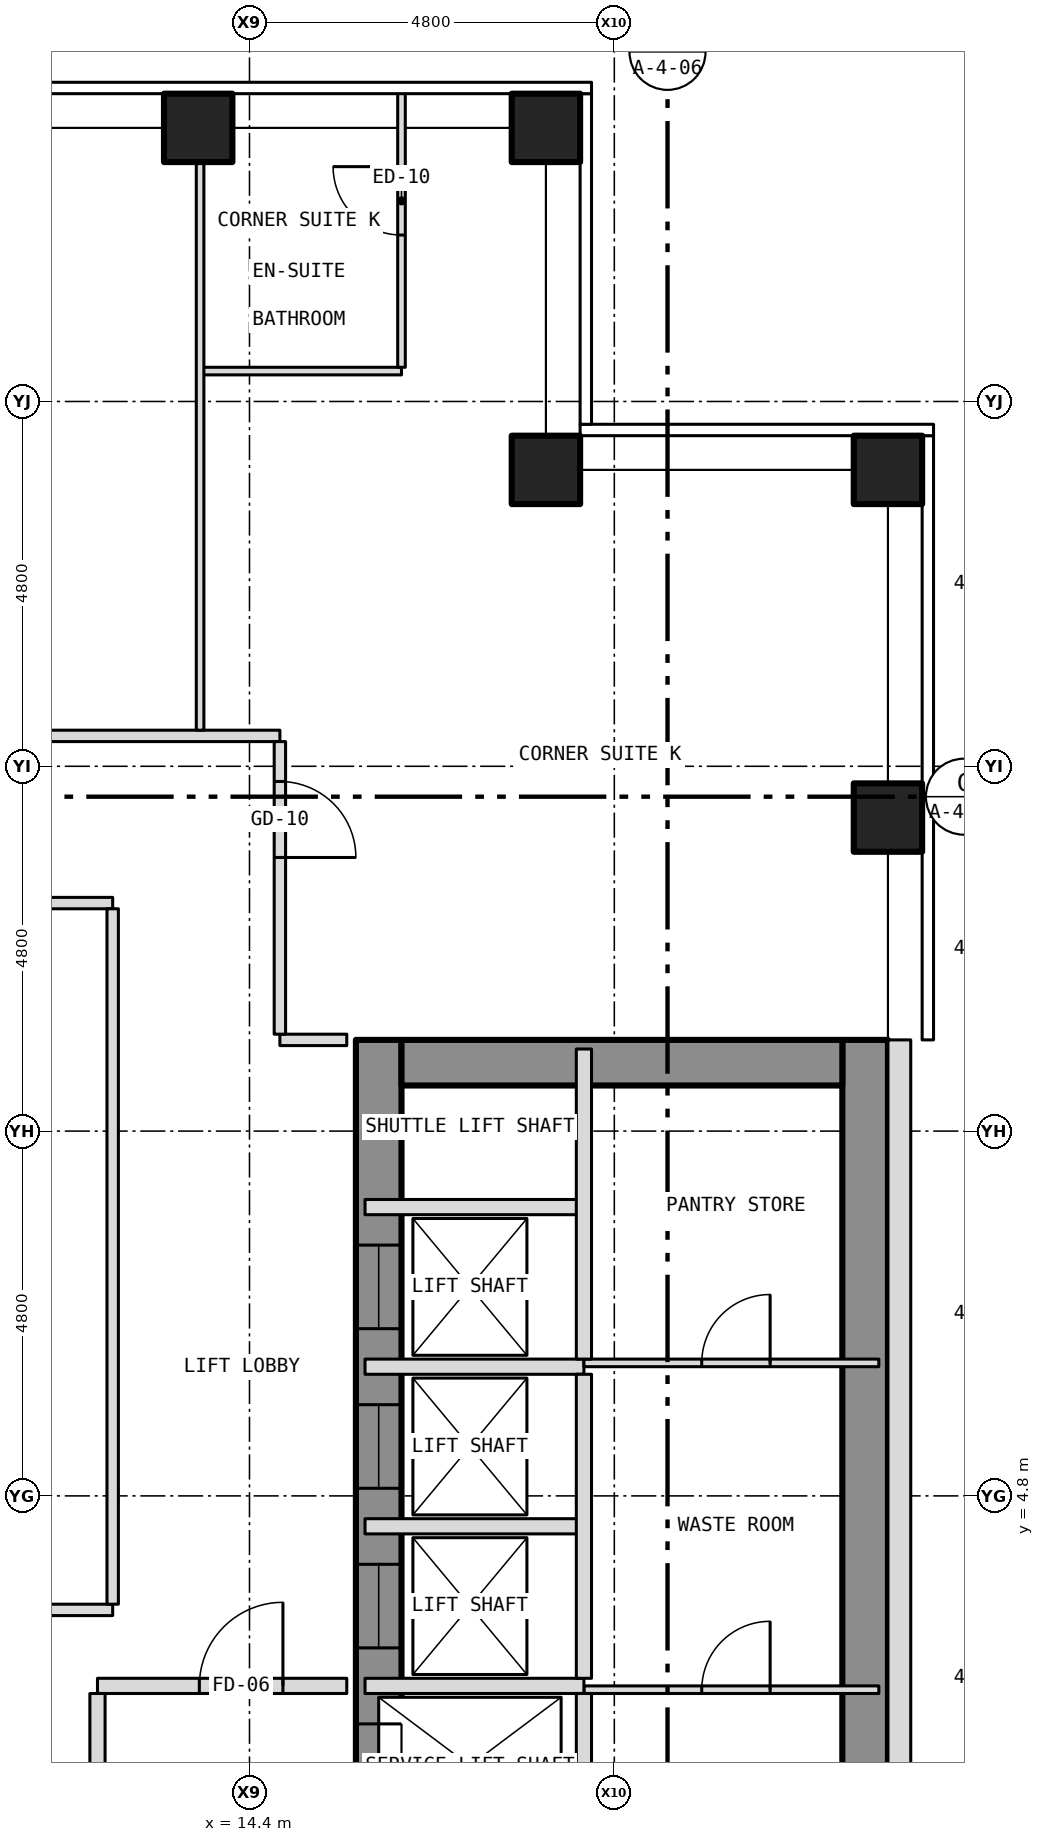
"""IFC4 building model, lengths in metres.
Left out: names, types, materials, properties, quantities, classifications, styles, units other than length and angle.
Written with IfcOpenShell. Run it as: python <this file> out.ifc"""

import sys

from ifc_helpers import new_model, si_unit, direction, frame, frame_2d, origin, origin_2d, place, context, subcontext, project, spatial, rectangle, hollow_rectangle, extrude, element, fill, save


model = new_model("IFC4")
c1 = context("Model", 3, precision=1e-05, world=origin(), true_north=direction((0.0, 1.0)))
c2 = subcontext(c1, "Body", "Model", "MODEL_VIEW")
j1 = project(units=[si_unit("LENGTHUNIT", "METRE"), si_unit("PLANEANGLEUNIT", "RADIAN")], contexts=[c1])
p1 = place(None, origin())
s1 = spatial("IfcSite", under=j1, at=p1, CompositionType="ELEMENT")
p2 = place(p1, origin())
s2 = spatial("IfcBuilding", under=s1, at=p2, CompositionType="ELEMENT")
p3 = place(p2, frame((0.0, 0.0, 103.0)))
s3 = spatial("IfcBuildingStorey", under=s2, at=p3, CompositionType="ELEMENT", Elevation=103.0)
for number, where, z_axis, x_axis in (
    (1, (13.725, 22.8, -0.15), (0.0, 0.0, 1.0), (1.0, 0.0, 0.0)),
    (2, (18.3, 22.8, -0.15), (0.0, 0.0, 1.0), (1.0, 0.0, 0.0)),
    (3, (22.8, 13.725, -0.15), (0.0, 0.0, 1.0), (1.0, 0.0, 0.0)),
    (4, (22.8, 18.3, -0.15), (0.0, 0.0, 1.0), (1.0, 0.0, 0.0)),
    (5, (18.3, 18.3, -0.15), (0.0, 0.0, 1.0), (1.0, 0.0, 0.0)),
):
    element("IfcColumn", number, at=place(p3, frame(where, z_axis=z_axis, x_axis=x_axis)), inside=s3, PredefinedType="COLUMN", context=c2, shape_type="SweptSolid", body=[
        extrude(hollow_rectangle(XDim=0.9, YDim=0.9, WallThickness=0.05, at=origin_2d()), origin(), (0.0, 0.0, 1.0), 3.5),
    ])
p4 = place(p3, frame((16.1, -10.8, 0.0), z_axis=(0.0, 0.0, 1.0), x_axis=(0.0, 1.0, 0.0)))
e6 = element("IfcWall", 6, at=p4, inside=s3, PredefinedType="SHEAR", context=c2, shape_type="SweptSolid", body=[
    extrude(rectangle(XDim=21.6, YDim=0.6, at=frame_2d((10.8, 0.0))), origin(), (0.0, 0.0, 1.0), 3.25),
])
p5 = place(p4, frame((9.4, 0.0, 0.0)))
e7 = element("IfcOpeningElement", 7, at=p5, cuts=e6, PredefinedType="OPENING", context=c2, shape_type="SweptSolid", body=[
    extrude(rectangle(XDim=1.1, YDim=2.1, at=frame_2d((0.55, 1.05))), frame((0.0, 0.312, 0.0), z_axis=(0.0, -1.0, 0.0), x_axis=(1.0, 0.0, 0.0)), (0.0, 0.0, 1.0), 0.624),
])
p6 = place(p4, frame((11.5, 0.0, 0.0)))
e8 = element("IfcOpeningElement", 8, at=p6, cuts=e6, PredefinedType="OPENING", context=c2, shape_type="SweptSolid", body=[
    extrude(rectangle(XDim=1.1, YDim=2.1, at=frame_2d((0.55, 1.05))), frame((0.0, 0.312, 0.0), z_axis=(0.0, -1.0, 0.0), x_axis=(1.0, 0.0, 0.0)), (0.0, 0.0, 1.0), 0.624),
])
p7 = place(p4, frame((13.6, 0.0, 0.0)))
e9 = element("IfcOpeningElement", 9, at=p7, cuts=e6, PredefinedType="OPENING", context=c2, shape_type="SweptSolid", body=[
    extrude(rectangle(XDim=1.1, YDim=2.1, at=frame_2d((0.55, 1.05))), frame((0.0, 0.312, 0.0), z_axis=(0.0, -1.0, 0.0), x_axis=(1.0, 0.0, 0.0)), (0.0, 0.0, 1.0), 0.624),
])
p8 = place(p4, frame((15.7, 0.0, 0.0)))
e10 = element("IfcOpeningElement", 10, at=p8, cuts=e6, PredefinedType="OPENING", context=c2, shape_type="SweptSolid", body=[
    extrude(rectangle(XDim=1.1, YDim=2.1, at=frame_2d((0.55, 1.05))), frame((0.0, 0.312, 0.0), z_axis=(0.0, -1.0, 0.0), x_axis=(1.0, 0.0, 0.0)), (0.0, 0.0, 1.0), 0.624),
])
p9 = place(p4, frame((17.8, 0.0, 0.0)))
e11 = element("IfcOpeningElement", 11, at=p9, cuts=e6, PredefinedType="OPENING", context=c2, shape_type="SweptSolid", body=[
    extrude(rectangle(XDim=1.1, YDim=2.1, at=frame_2d((0.55, 1.05))), frame((0.0, 0.312, 0.0), z_axis=(0.0, -1.0, 0.0), x_axis=(1.0, 0.0, 0.0)), (0.0, 0.0, 1.0), 0.624),
])
p10 = place(p4, frame((5.642, 0.0, 0.0)))
e12 = element("IfcOpeningElement", 12, at=p10, cuts=e6, PredefinedType="OPENING", context=c2, shape_type="SweptSolid", body=[
    extrude(rectangle(XDim=1.1, YDim=2.1, at=frame_2d((0.55, 1.05))), frame((0.0, 0.312, 0.0), z_axis=(0.0, -1.0, 0.0), x_axis=(1.0, 0.0, 0.0)), (0.0, 0.0, 1.0), 0.624),
])
p11 = place(p4, frame((7.5, 0.0, 0.0)))
e13 = element("IfcOpeningElement", 13, at=p11, cuts=e6, PredefinedType="OPENING", context=c2, shape_type="SweptSolid", body=[
    extrude(rectangle(XDim=1.1, YDim=2.1, at=frame_2d((0.55, 1.05))), frame((0.0, 0.312, 0.0), z_axis=(0.0, -1.0, 0.0), x_axis=(1.0, 0.0, 0.0)), (0.0, 0.0, 1.0), 0.624),
])
p12 = place(p3, frame((22.5, -10.8, 0.0), z_axis=(0.0, 0.0, 1.0), x_axis=(0.0, 1.0, 0.0)))
e14 = element("IfcWall", 14, at=p12, inside=s3, PredefinedType="SHEAR", context=c2, shape_type="SweptSolid", body=[
    extrude(rectangle(XDim=21.6, YDim=0.6, at=frame_2d((10.8, 0.0))), origin(), (0.0, 0.0, 1.0), 3.25),
])
p13 = place(p3, frame((16.4, 10.5, 0.0), z_axis=(0.0, 0.0, 1.0), x_axis=(1.0, 0.0, 0.0)))
e15 = element("IfcWall", 15, at=p13, inside=s3, PredefinedType="SHEAR", context=c2, shape_type="SweptSolid", body=[
    extrude(rectangle(XDim=5.8, YDim=0.6, at=frame_2d((2.9, 0.0))), origin(), (0.0, 0.0, 1.0), 3.25),
])
p14 = place(p3, frame((22.95, -10.8, 0.0), z_axis=(0.0, 0.0, 1.0), x_axis=(0.0, 1.0, 0.0)))
e16 = element("IfcWall", 16, at=p14, inside=s3, PredefinedType="SOLIDWALL", context=c2, shape_type="SweptSolid", body=[
    extrude(rectangle(XDim=21.6, YDim=0.3, at=frame_2d((10.8, 0.0))), origin(), (0.0, 0.0, 1.0), 3.5),
])
p15 = place(p14, frame((2.95, 0.0, 1.0)))
e17 = element("IfcOpeningElement", 17, at=p15, cuts=e16, PredefinedType="OPENING", context=c2, shape_type="SweptSolid", body=[
    extrude(rectangle(XDim=0.6, YDim=1.5, at=frame_2d((0.3, 0.75))), frame((0.0, 0.162, 0.0), z_axis=(0.0, -1.0, 0.0), x_axis=(1.0, 0.0, 0.0)), (0.0, 0.0, 1.0), 0.324),
])
p16 = place(p3, frame((18.8, 2.25, 0.0), z_axis=(0.0, 0.0, 1.0), x_axis=(1.0, 0.0, 0.0)))
e18 = element("IfcWall", 18, at=p16, inside=s3, PredefinedType="PARTITIONING", context=c2, shape_type="SweptSolid", body=[
    extrude(rectangle(XDim=3.88, YDim=0.1, at=frame_2d((1.94, 0.0))), origin(), (0.0, 0.0, 1.0), 3.25),
])
p17 = place(p16, frame((1.55, 0.0, 0.0)))
e19 = element("IfcOpeningElement", 19, at=p17, cuts=e18, PredefinedType="OPENING", context=c2, shape_type="SweptSolid", body=[
    extrude(rectangle(XDim=0.9, YDim=2.1, at=frame_2d((0.45, 1.05))), frame((0.0, 0.062, 0.0), z_axis=(0.0, -1.0, 0.0), x_axis=(1.0, 0.0, 0.0)), (0.0, 0.0, 1.0), 0.124),
])
p18 = place(p3, frame((12.4, 2.3, 0.0), z_axis=(0.0, 0.0, 1.0), x_axis=(1.0, 0.0, 0.0)))
e20 = element("IfcWall", 20, at=p18, inside=s3, PredefinedType="PARTITIONING", context=c2, shape_type="SweptSolid", body=[
    extrude(rectangle(XDim=3.28, YDim=0.2, at=frame_2d((1.64, 0.0))), origin(), (0.0, 0.0, 1.0), 3.35),
])
p19 = place(p18, frame((1.34, 0.0, 0.0)))
e21 = element("IfcOpeningElement", 21, at=p19, cuts=e20, PredefinedType="OPENING", context=c2, shape_type="SweptSolid", body=[
    extrude(rectangle(XDim=1.1, YDim=2.1, at=frame_2d((0.55, 1.05))), frame((0.0, 0.112, 0.0), z_axis=(0.0, -1.0, 0.0), x_axis=(1.0, 0.0, 0.0)), (0.0, 0.0, 1.0), 0.224),
])
p20 = place(p3, frame((15.92, 2.3, 0.0), z_axis=(0.0, 0.0, 1.0), x_axis=(1.0, 0.0, 0.0)))
e22 = element("IfcWall", 22, at=p20, inside=s3, PredefinedType="PARTITIONING", context=c2, shape_type="SweptSolid", body=[
    extrude(rectangle(XDim=2.88, YDim=0.2, at=frame_2d((1.44, 0.0))), origin(), (0.0, 0.0, 1.0), 3.25),
])
p21 = place(p3, frame((-12.6, 3.3, 0.0), z_axis=(0.0, 0.0, 1.0), x_axis=(1.0, 0.0, 0.0)))
e23 = element("IfcWall", 23, at=p21, inside=s3, PredefinedType="PARTITIONING", context=c2, shape_type="SweptSolid", body=[
    extrude(rectangle(XDim=25.2, YDim=0.15, at=frame_2d((12.6, 0.0))), origin(), (0.0, 0.0, 1.0), 3.35),
])
for number, where, z_axis, x_axis in (
    (24, (15.92, 4.4, 0.0), (0.0, 0.0, 1.0), (1.0, 0.0, 0.0)),
    (25, (15.92, 6.5, 0.0), (0.0, 0.0, 1.0), (1.0, 0.0, 0.0)),
):
    element("IfcWall", number, at=place(p3, frame(where, z_axis=z_axis, x_axis=x_axis)), inside=s3, PredefinedType="PARTITIONING", context=c2, shape_type="SweptSolid", body=[
        extrude(rectangle(XDim=2.88, YDim=0.2, at=frame_2d((1.44, 0.0))), origin(), (0.0, 0.0, 1.0), 3.25),
    ])
p22 = place(p3, frame((18.8, 6.55, 0.0), z_axis=(0.0, 0.0, 1.0), x_axis=(1.0, 0.0, 0.0)))
e26 = element("IfcWall", 26, at=p22, inside=s3, PredefinedType="PARTITIONING", context=c2, shape_type="SweptSolid", body=[
    extrude(rectangle(XDim=3.88, YDim=0.1, at=frame_2d((1.94, 0.0))), origin(), (0.0, 0.0, 1.0), 3.25),
])
p23 = place(p22, frame((1.55, 0.0, 0.0)))
e27 = element("IfcOpeningElement", 27, at=p23, cuts=e26, PredefinedType="OPENING", context=c2, shape_type="SweptSolid", body=[
    extrude(rectangle(XDim=0.9, YDim=2.1, at=frame_2d((0.45, 1.05))), frame((0.0, 0.062, 0.0), z_axis=(0.0, -1.0, 0.0), x_axis=(1.0, 0.0, 0.0)), (0.0, 0.0, 1.0), 0.124),
])
p24 = place(p3, frame((15.92, 8.6, 0.0), z_axis=(0.0, 0.0, 1.0), x_axis=(1.0, 0.0, 0.0)))
e28 = element("IfcWall", 28, at=p24, inside=s3, PredefinedType="PARTITIONING", context=c2, shape_type="SweptSolid", body=[
    extrude(rectangle(XDim=2.88, YDim=0.2, at=frame_2d((1.44, 0.0))), origin(), (0.0, 0.0, 1.0), 3.25),
])
p25 = place(p3, frame((14.8, 10.8, 0.0), z_axis=(0.0, 0.0, 1.0), x_axis=(1.0, 0.0, 0.0)))
e29 = element("IfcWall", 29, at=p25, inside=s3, PredefinedType="PARTITIONING", context=c2, shape_type="SweptSolid", body=[
    extrude(rectangle(XDim=0.88, YDim=0.15, at=frame_2d((0.44, 0.0))), origin(), (0.0, 0.0, 1.0), 3.35),
])
p26 = place(p3, frame((-12.6, 12.6, 0.0), z_axis=(0.0, 0.0, 1.0), x_axis=(1.0, 0.0, 0.0)))
e30 = element("IfcWall", 30, at=p26, inside=s3, PredefinedType="PARTITIONING", context=c2, shape_type="SweptSolid", body=[
    extrude(rectangle(XDim=25.2, YDim=0.15, at=frame_2d((12.6, 0.0))), origin(), (0.0, 0.0, 1.0), 3.35),
])
p27 = place(p26, frame((5.85, 0.0, 0.0)))
e31 = element("IfcOpeningElement", 31, at=p27, cuts=e30, PredefinedType="OPENING", context=c2, shape_type="SweptSolid", body=[
    extrude(rectangle(XDim=0.9, YDim=2.1, at=frame_2d((0.45, 1.05))), frame((0.0, 0.087, 0.0), z_axis=(0.0, -1.0, 0.0), x_axis=(1.0, 0.0, 0.0)), (0.0, 0.0, 1.0), 0.174),
])
p28 = place(p26, frame((18.45, 0.0, 0.0)))
e32 = element("IfcOpeningElement", 32, at=p28, cuts=e30, PredefinedType="OPENING", context=c2, shape_type="SweptSolid", body=[
    extrude(rectangle(XDim=0.9, YDim=2.1, at=frame_2d((0.45, 1.05))), frame((0.0, 0.087, 0.0), z_axis=(0.0, -1.0, 0.0), x_axis=(1.0, 0.0, 0.0)), (0.0, 0.0, 1.0), 0.174),
])
p29 = place(p3, frame((-14.8, 14.8, 0.0), z_axis=(0.0, 0.0, 1.0), x_axis=(1.0, 0.0, 0.0)))
e33 = element("IfcWall", 33, at=p29, inside=s3, PredefinedType="PARTITIONING", context=c2, shape_type="SweptSolid", body=[
    extrude(rectangle(XDim=29.6, YDim=0.15, at=frame_2d((14.8, 0.0))), origin(), (0.0, 0.0, 1.0), 3.35),
])
p30 = place(p29, frame((3.963, 0.0, 0.0)))
e34 = element("IfcOpeningElement", 34, at=p30, cuts=e33, PredefinedType="OPENING", context=c2, shape_type="SweptSolid", body=[
    extrude(rectangle(XDim=1.0, YDim=2.1, at=frame_2d((0.5, 1.05))), frame((0.0, 0.087, 0.0), z_axis=(0.0, -1.0, 0.0), x_axis=(1.0, 0.0, 0.0)), (0.0, 0.0, 1.0), 0.174),
])
p31 = place(p29, frame((12.241, 0.0, 0.0)))
e35 = element("IfcOpeningElement", 35, at=p31, cuts=e33, PredefinedType="OPENING", context=c2, shape_type="SweptSolid", body=[
    extrude(rectangle(XDim=1.0, YDim=2.1, at=frame_2d((0.5, 1.05))), frame((0.0, 0.087, 0.0), z_axis=(0.0, -1.0, 0.0), x_axis=(1.0, 0.0, 0.0)), (0.0, 0.0, 1.0), 0.174),
])
p32 = place(p29, frame((21.213, 0.0, 0.0)))
e36 = element("IfcOpeningElement", 36, at=p32, cuts=e33, PredefinedType="OPENING", context=c2, shape_type="SweptSolid", body=[
    extrude(rectangle(XDim=0.9, YDim=2.1, at=frame_2d((0.45, 1.05))), frame((0.0, 0.087, 0.0), z_axis=(0.0, -1.0, 0.0), x_axis=(1.0, 0.0, 0.0)), (0.0, 0.0, 1.0), 0.174),
])
p33 = place(p3, frame((13.75, 19.6, 0.0), z_axis=(0.0, 0.0, 1.0), x_axis=(1.0, 0.0, 0.0)))
e37 = element("IfcWall", 37, at=p33, inside=s3, PredefinedType="PARTITIONING", context=c2, shape_type="SweptSolid", body=[
    extrude(rectangle(XDim=2.65, YDim=0.1, at=frame_2d((1.325, 0.0))), origin(), (0.0, 0.0, 1.0), 3.35),
])
p34 = place(p3, frame((12.4, -1.8, 0.0), z_axis=(0.0, 0.0, 1.0), x_axis=(0.0, 1.0, 0.0)))
e38 = element("IfcWall", 38, at=p34, inside=s3, PredefinedType="PARTITIONING", context=c2, shape_type="SweptSolid", body=[
    extrude(rectangle(XDim=4.0, YDim=0.2, at=frame_2d((2.0, 0.0))), origin(), (0.0, 0.0, 1.0), 3.35),
])
p35 = place(p3, frame((12.6, 3.375, 0.0), z_axis=(0.0, 0.0, 1.0), x_axis=(0.0, 1.0, 0.0)))
e39 = element("IfcWall", 39, at=p35, inside=s3, PredefinedType="PARTITIONING", context=c2, shape_type="SweptSolid", body=[
    extrude(rectangle(XDim=9.15, YDim=0.15, at=frame_2d((4.575, 0.0))), origin(), (0.0, 0.0, 1.0), 3.35),
])
p36 = place(p3, frame((13.75, 14.875, 0.0), z_axis=(0.0, 0.0, 1.0), x_axis=(0.0, 1.0, 0.0)))
e40 = element("IfcWall", 40, at=p36, inside=s3, PredefinedType="PARTITIONING", context=c2, shape_type="SweptSolid", body=[
    extrude(rectangle(XDim=7.805, YDim=0.1, at=frame_2d((3.902, 0.0))), origin(), (0.0, 0.0, 1.0), 3.35),
])
p37 = place(p3, frame((14.8, 10.875, 0.0), z_axis=(0.0, 0.0, 1.0), x_axis=(0.0, 1.0, 0.0)))
e41 = element("IfcWall", 41, at=p37, inside=s3, PredefinedType="PARTITIONING", context=c2, shape_type="SweptSolid", body=[
    extrude(rectangle(XDim=3.85, YDim=0.15, at=frame_2d((1.925, 0.0))), origin(), (0.0, 0.0, 1.0), 3.35),
])
p38 = place(p37, frame((2.325, 0.0, 0.0)))
e42 = element("IfcOpeningElement", 42, at=p38, cuts=e41, PredefinedType="OPENING", context=c2, shape_type="SweptSolid", body=[
    extrude(rectangle(XDim=1.0, YDim=2.1, at=frame_2d((0.5, 1.05))), frame((0.0, 0.087, 0.0), z_axis=(0.0, -1.0, 0.0), x_axis=(1.0, 0.0, 0.0)), (0.0, 0.0, 1.0), 0.174),
])
p39 = place(p3, frame((16.4, 19.65, 0.0), z_axis=(0.0, 0.0, 1.0), x_axis=(0.0, 1.0, 0.0)))
e43 = element("IfcWall", 43, at=p39, inside=s3, PredefinedType="PARTITIONING", context=c2, shape_type="SweptSolid", body=[
    extrude(rectangle(XDim=3.63, YDim=0.1, at=frame_2d((1.815, 0.0))), origin(), (0.0, 0.0, 1.0), 3.35),
])
p40 = place(p39, frame((1.74, 0.0, 0.0)))
e44 = element("IfcOpeningElement", 44, at=p40, cuts=e43, PredefinedType="OPENING", context=c2, shape_type="SweptSolid", body=[
    extrude(rectangle(XDim=0.9, YDim=2.1, at=frame_2d((0.45, 1.05))), frame((0.0, 0.062, 0.0), z_axis=(0.0, -1.0, 0.0), x_axis=(1.0, 0.0, 0.0)), (0.0, 0.0, 1.0), 0.124),
])
for number, where, z_axis, x_axis in (
    (45, (18.8, -1.8, 0.0), (0.0, 0.0, 1.0), (0.0, 1.0, 0.0)),
    (46, (18.8, 2.4, 0.0), (0.0, 0.0, 1.0), (0.0, 1.0, 0.0)),
):
    element("IfcWall", number, at=place(p3, frame(where, z_axis=z_axis, x_axis=x_axis)), inside=s3, PredefinedType="PARTITIONING", context=c2, shape_type="SweptSolid", body=[
        extrude(rectangle(XDim=4.0, YDim=0.2, at=frame_2d((2.0, 0.0))), origin(), (0.0, 0.0, 1.0), 3.25),
    ])
p41 = place(p3, frame((18.8, 6.6, 0.0), z_axis=(0.0, 0.0, 1.0), x_axis=(0.0, 1.0, 0.0)))
e47 = element("IfcWall", 47, at=p41, inside=s3, PredefinedType="PARTITIONING", context=c2, shape_type="SweptSolid", body=[
    extrude(rectangle(XDim=4.08, YDim=0.2, at=frame_2d((2.04, 0.0))), origin(), (0.0, 0.0, 1.0), 3.25),
])
p42 = place(p6, origin())
e48 = element("IfcDoor", 48, at=p42, inside=s3, OperationType="SLIDING_TO_LEFT", PredefinedType="DOOR", context=c2, shape_type="SweptSolid", body=[
    extrude(rectangle(XDim=1.1, YDim=2.1, at=frame_2d((0.55, 1.05))), frame((0.0, 0.025, 0.0), z_axis=(0.0, -1.0, 0.0), x_axis=(1.0, 0.0, 0.0)), (0.0, 0.0, 1.0), 0.05),
])
fill(e8, e48)
p43 = place(p7, origin())
e49 = element("IfcDoor", 49, at=p43, inside=s3, OperationType="SLIDING_TO_LEFT", PredefinedType="DOOR", context=c2, shape_type="SweptSolid", body=[
    extrude(rectangle(XDim=1.1, YDim=2.1, at=frame_2d((0.55, 1.05))), frame((0.0, 0.025, 0.0), z_axis=(0.0, -1.0, 0.0), x_axis=(1.0, 0.0, 0.0)), (0.0, 0.0, 1.0), 0.05),
])
fill(e9, e49)
p44 = place(p8, origin())
e50 = element("IfcDoor", 50, at=p44, inside=s3, OperationType="SLIDING_TO_LEFT", PredefinedType="DOOR", context=c2, shape_type="SweptSolid", body=[
    extrude(rectangle(XDim=1.1, YDim=2.1, at=frame_2d((0.55, 1.05))), frame((0.0, 0.025, 0.0), z_axis=(0.0, -1.0, 0.0), x_axis=(1.0, 0.0, 0.0)), (0.0, 0.0, 1.0), 0.05),
])
fill(e10, e50)
p45 = place(p9, origin())
e51 = element("IfcDoor", 51, at=p45, inside=s3, OperationType="SLIDING_TO_LEFT", PredefinedType="DOOR", context=c2, shape_type="SweptSolid", body=[
    extrude(rectangle(XDim=1.1, YDim=2.1, at=frame_2d((0.55, 1.05))), frame((0.0, 0.025, 0.0), z_axis=(0.0, -1.0, 0.0), x_axis=(1.0, 0.0, 0.0)), (0.0, 0.0, 1.0), 0.05),
])
fill(e11, e51)
p46 = place(p17, origin())
e52 = element("IfcDoor", 52, at=p46, inside=s3, OperationType="SINGLE_SWING_RIGHT", PredefinedType="DOOR", context=c2, shape_type="SweptSolid", body=[
    extrude(rectangle(XDim=0.9, YDim=2.1, at=frame_2d((0.45, 1.05))), frame((0.0, 0.025, 0.0), z_axis=(0.0, -1.0, 0.0), x_axis=(1.0, 0.0, 0.0)), (0.0, 0.0, 1.0), 0.05),
])
fill(e19, e52)
p47 = place(p23, origin())
e53 = element("IfcDoor", 53, at=p47, inside=s3, OperationType="SINGLE_SWING_RIGHT", PredefinedType="DOOR", context=c2, shape_type="SweptSolid", body=[
    extrude(rectangle(XDim=0.9, YDim=2.1, at=frame_2d((0.45, 1.05))), frame((0.0, 0.025, 0.0), z_axis=(0.0, -1.0, 0.0), x_axis=(1.0, 0.0, 0.0)), (0.0, 0.0, 1.0), 0.05),
])
fill(e27, e53)
p48 = place(p19, origin())
e54 = element("IfcDoor", 54, at=p48, inside=s3, OperationType="SINGLE_SWING_RIGHT", PredefinedType="DOOR", context=c2, shape_type="SweptSolid", body=[
    extrude(rectangle(XDim=1.1, YDim=2.1, at=frame_2d((0.55, 1.05))), frame((0.0, 0.025, 0.0), z_axis=(0.0, -1.0, 0.0), x_axis=(1.0, 0.0, 0.0)), (0.0, 0.0, 1.0), 0.05),
])
fill(e21, e54)
p49 = place(p40, origin())
e55 = element("IfcDoor", 55, at=p49, inside=s3, OperationType="SINGLE_SWING_RIGHT", PredefinedType="DOOR", context=c2, shape_type="SweptSolid", body=[
    extrude(rectangle(XDim=0.9, YDim=2.1, at=frame_2d((0.45, 1.05))), frame((0.0, 0.025, 0.0), z_axis=(0.0, -1.0, 0.0), x_axis=(1.0, 0.0, 0.0)), (0.0, 0.0, 1.0), 0.05),
])
fill(e44, e55)
p50 = place(p38, origin())
e56 = element("IfcDoor", 56, at=p50, inside=s3, OperationType="SINGLE_SWING_LEFT", PredefinedType="DOOR", context=c2, shape_type="SweptSolid", body=[
    extrude(rectangle(XDim=1.0, YDim=2.1, at=frame_2d((0.5, 1.05))), frame((0.0, 0.025, 0.0), z_axis=(0.0, -1.0, 0.0), x_axis=(1.0, 0.0, 0.0)), (0.0, 0.0, 1.0), 0.05),
])
fill(e42, e56)
save(model, sys.argv[1])
